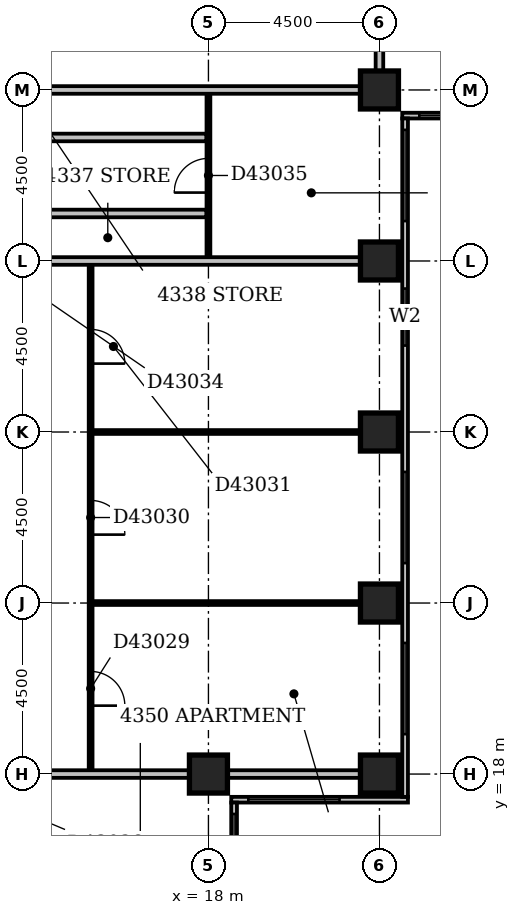
"""IFC4 building model, lengths in metres.
Left out: names, types, materials, properties, quantities, classifications, styles, units other than length and angle.
Written with IfcOpenShell. Run it as: python <this file> out.ifc"""

import sys

from ifc_helpers import new_model, si_unit, direction, frame, frame_2d, origin, origin_2d, place, context, subcontext, project, spatial, rectangle, extrude, element, fill, save


model = new_model("IFC4")
c1 = context("Model", 3, precision=1e-05, world=origin(), true_north=direction((0.0, 1.0)))
c2 = subcontext(c1, "Body", "Model", "MODEL_VIEW")
j1 = project(units=[si_unit("LENGTHUNIT", "METRE"), si_unit("PLANEANGLEUNIT", "RADIAN")], contexts=[c1])
p1 = place(None, origin())
s1 = spatial("IfcSite", under=j1, at=p1, CompositionType="ELEMENT")
p2 = place(p1, origin())
s2 = spatial("IfcBuilding", under=s1, at=p2, CompositionType="ELEMENT")
p3 = place(p2, frame((0.0, 0.0, 170.0)))
s3 = spatial("IfcBuildingStorey", under=s2, at=p3, CompositionType="ELEMENT", Elevation=170.0)
for number, where, z_axis, x_axis in (
    (1, (18.0, 18.0, -0.3), (0.0, 0.0, 1.0), (1.0, 0.0, 0.0)),
    (2, (22.5, 18.0, -0.3), (0.0, 0.0, 1.0), (1.0, 0.0, 0.0)),
    (3, (22.5, 22.5, -0.3), (0.0, 0.0, 1.0), (1.0, 0.0, 0.0)),
    (4, (22.5, 27.0, -0.3), (0.0, 0.0, 1.0), (1.0, 0.0, 0.0)),
    (5, (22.5, 31.5, -0.3), (0.0, 0.0, 1.0), (1.0, 0.0, 0.0)),
    (6, (22.5, 36.0, -0.3), (0.0, 0.0, 1.0), (1.0, 0.0, 0.0)),
):
    element("IfcColumn", number, at=place(p3, frame(where, z_axis=z_axis, x_axis=x_axis)), inside=s3, PredefinedType="COLUMN", context=c2, shape_type="SweptSolid", body=[
        extrude(rectangle(XDim=1.0, YDim=1.0, at=origin_2d()), origin(), (0.0, 0.0, 1.0), 3.45),
    ])
p4 = place(p3, frame((18.675, 8.4, 0.0), z_axis=(0.0, 0.0, 1.0), x_axis=(0.0, 1.0, 0.0)))
e7 = element("IfcWall", 7, at=p4, inside=s3, PredefinedType="STANDARD", context=c2, shape_type="SweptSolid", body=[
    extrude(rectangle(XDim=8.85, YDim=0.15, at=frame_2d((4.425, 0.0))), origin(), (0.0, 0.0, 1.0), 2.5),
])
p5 = place(p4, frame((1.65, 0.0, 0.6)))
e8 = element("IfcOpeningElement", 8, at=p5, cuts=e7, PredefinedType="OPENING", context=c2, shape_type="SweptSolid", body=[
    extrude(rectangle(XDim=2.4, YDim=1.8, at=frame_2d((1.2, 0.9))), frame((0.0, 0.087, 0.0), z_axis=(0.0, -1.0, 0.0), x_axis=(1.0, 0.0, 0.0)), (0.0, 0.0, 1.0), 0.174),
])
p6 = place(p4, frame((6.15, 0.0, 0.6)))
e9 = element("IfcOpeningElement", 9, at=p6, cuts=e7, PredefinedType="OPENING", context=c2, shape_type="SweptSolid", body=[
    extrude(rectangle(XDim=2.4, YDim=1.8, at=frame_2d((1.2, 0.9))), frame((0.0, 0.087, 0.0), z_axis=(0.0, -1.0, 0.0), x_axis=(1.0, 0.0, 0.0)), (0.0, 0.0, 1.0), 0.174),
])
p7 = place(p3, frame((18.6, 17.325, 0.0), z_axis=(0.0, 0.0, 1.0), x_axis=(1.0, 0.0, 0.0)))
e10 = element("IfcWall", 10, at=p7, inside=s3, PredefinedType="STANDARD", context=c2, shape_type="SweptSolid", body=[
    extrude(rectangle(XDim=4.65, YDim=0.15, at=frame_2d((2.325, 0.0))), origin(), (0.0, 0.0, 1.0), 2.5),
])
p8 = place(p7, frame((0.45, 0.0, 0.6)))
e11 = element("IfcOpeningElement", 11, at=p8, cuts=e10, PredefinedType="OPENING", context=c2, shape_type="SweptSolid", body=[
    extrude(rectangle(XDim=2.4, YDim=1.8, at=frame_2d((1.2, 0.9))), frame((0.0, 0.087, 0.0), z_axis=(0.0, -1.0, 0.0), x_axis=(1.0, 0.0, 0.0)), (0.0, 0.0, 1.0), 0.174),
])
p9 = place(p3, frame((23.175, 17.4, 0.0), z_axis=(0.0, 0.0, 1.0), x_axis=(0.0, 1.0, 0.0)))
e12 = element("IfcWall", 12, at=p9, inside=s3, PredefinedType="STANDARD", context=c2, shape_type="SweptSolid", body=[
    extrude(rectangle(XDim=17.85, YDim=0.15, at=frame_2d((8.925, 0.0))), origin(), (0.0, 0.0, 1.0), 2.5),
])
p10 = place(p9, frame((1.65, 0.0, 0.6)))
e13 = element("IfcOpeningElement", 13, at=p10, cuts=e12, PredefinedType="OPENING", context=c2, shape_type="SweptSolid", body=[
    extrude(rectangle(XDim=2.4, YDim=1.8, at=frame_2d((1.2, 0.9))), frame((0.0, 0.087, 0.0), z_axis=(0.0, -1.0, 0.0), x_axis=(1.0, 0.0, 0.0)), (0.0, 0.0, 1.0), 0.174),
])
p11 = place(p9, frame((6.15, 0.0, 0.6)))
e14 = element("IfcOpeningElement", 14, at=p11, cuts=e12, PredefinedType="OPENING", context=c2, shape_type="SweptSolid", body=[
    extrude(rectangle(XDim=2.4, YDim=1.8, at=frame_2d((1.2, 0.9))), frame((0.0, 0.087, 0.0), z_axis=(0.0, -1.0, 0.0), x_axis=(1.0, 0.0, 0.0)), (0.0, 0.0, 1.0), 0.174),
])
p12 = place(p9, frame((11.875, 0.0, 0.6)))
e15 = element("IfcOpeningElement", 15, at=p12, cuts=e12, PredefinedType="OPENING", context=c2, shape_type="SweptSolid", body=[
    extrude(rectangle(XDim=1.5, YDim=1.8, at=frame_2d((0.75, 0.9))), frame((0.0, 0.087, 0.0), z_axis=(0.0, -1.0, 0.0), x_axis=(1.0, 0.0, 0.0)), (0.0, 0.0, 1.0), 0.174),
])
p13 = place(p9, frame((15.15, 0.0, 0.6)))
e16 = element("IfcOpeningElement", 16, at=p13, cuts=e12, PredefinedType="OPENING", context=c2, shape_type="SweptSolid", body=[
    extrude(rectangle(XDim=2.4, YDim=1.8, at=frame_2d((1.2, 0.9))), frame((0.0, 0.087, 0.0), z_axis=(0.0, -1.0, 0.0), x_axis=(1.0, 0.0, 0.0)), (0.0, 0.0, 1.0), 0.174),
])
p14 = place(p3, frame((23.1, 35.325, 0.0), z_axis=(0.0, 0.0, 1.0), x_axis=(1.0, 0.0, 0.0)))
e17 = element("IfcWall", 17, at=p14, inside=s3, PredefinedType="STANDARD", context=c2, shape_type="SweptSolid", body=[
    extrude(rectangle(XDim=45.15, YDim=0.15, at=frame_2d((22.575, 0.0))), origin(), (0.0, 0.0, 1.0), 2.5),
])
p15 = place(p14, frame((0.45, 0.0, 0.6)))
e18 = element("IfcOpeningElement", 18, at=p15, cuts=e17, PredefinedType="OPENING", context=c2, shape_type="SweptSolid", body=[
    extrude(rectangle(XDim=2.4, YDim=1.8, at=frame_2d((1.2, 0.9))), frame((0.0, 0.087, 0.0), z_axis=(0.0, -1.0, 0.0), x_axis=(1.0, 0.0, 0.0)), (0.0, 0.0, 1.0), 0.174),
])
p16 = place(p14, frame((4.684, 0.0, 0.6)))
e19 = element("IfcOpeningElement", 19, at=p16, cuts=e17, PredefinedType="OPENING", context=c2, shape_type="SweptSolid", body=[
    extrude(rectangle(XDim=2.4, YDim=1.8, at=frame_2d((1.2, 0.9))), frame((0.0, 0.087, 0.0), z_axis=(0.0, -1.0, 0.0), x_axis=(1.0, 0.0, 0.0)), (0.0, 0.0, 1.0), 0.174),
])
p17 = place(p14, frame((9.45, 0.0, 0.6)))
e20 = element("IfcOpeningElement", 20, at=p17, cuts=e17, PredefinedType="OPENING", context=c2, shape_type="SweptSolid", body=[
    extrude(rectangle(XDim=2.4, YDim=1.8, at=frame_2d((1.2, 0.9))), frame((0.0, 0.087, 0.0), z_axis=(0.0, -1.0, 0.0), x_axis=(1.0, 0.0, 0.0)), (0.0, 0.0, 1.0), 0.174),
])
p18 = place(p14, frame((13.95, 0.0, 0.6)))
e21 = element("IfcOpeningElement", 21, at=p18, cuts=e17, PredefinedType="OPENING", context=c2, shape_type="SweptSolid", body=[
    extrude(rectangle(XDim=2.4, YDim=1.8, at=frame_2d((1.2, 0.9))), frame((0.0, 0.087, 0.0), z_axis=(0.0, -1.0, 0.0), x_axis=(1.0, 0.0, 0.0)), (0.0, 0.0, 1.0), 0.174),
])
p19 = place(p14, frame((19.076, 0.0, 0.6)))
e22 = element("IfcOpeningElement", 22, at=p19, cuts=e17, PredefinedType="OPENING", context=c2, shape_type="SweptSolid", body=[
    extrude(rectangle(XDim=2.1, YDim=1.8, at=frame_2d((1.05, 0.9))), frame((0.0, 0.087, 0.0), z_axis=(0.0, -1.0, 0.0), x_axis=(1.0, 0.0, 0.0)), (0.0, 0.0, 1.0), 0.174),
])
p20 = place(p14, frame((22.95, 0.0, 0.6)))
e23 = element("IfcOpeningElement", 23, at=p20, cuts=e17, PredefinedType="OPENING", context=c2, shape_type="SweptSolid", body=[
    extrude(rectangle(XDim=2.4, YDim=1.8, at=frame_2d((1.2, 0.9))), frame((0.0, 0.087, 0.0), z_axis=(0.0, -1.0, 0.0), x_axis=(1.0, 0.0, 0.0)), (0.0, 0.0, 1.0), 0.174),
])
p21 = place(p14, frame((27.45, 0.0, 0.6)))
e24 = element("IfcOpeningElement", 24, at=p21, cuts=e17, PredefinedType="OPENING", context=c2, shape_type="SweptSolid", body=[
    extrude(rectangle(XDim=2.4, YDim=1.8, at=frame_2d((1.2, 0.9))), frame((0.0, 0.087, 0.0), z_axis=(0.0, -1.0, 0.0), x_axis=(1.0, 0.0, 0.0)), (0.0, 0.0, 1.0), 0.174),
])
p22 = place(p14, frame((31.95, 0.0, 0.6)))
e25 = element("IfcOpeningElement", 25, at=p22, cuts=e17, PredefinedType="OPENING", context=c2, shape_type="SweptSolid", body=[
    extrude(rectangle(XDim=2.4, YDim=1.8, at=frame_2d((1.2, 0.9))), frame((0.0, 0.087, 0.0), z_axis=(0.0, -1.0, 0.0), x_axis=(1.0, 0.0, 0.0)), (0.0, 0.0, 1.0), 0.174),
])
p23 = place(p14, frame((38.285, 0.0, 0.6)))
e26 = element("IfcOpeningElement", 26, at=p23, cuts=e17, PredefinedType="OPENING", context=c2, shape_type="SweptSolid", body=[
    extrude(rectangle(XDim=0.9, YDim=1.8, at=frame_2d((0.45, 0.9))), frame((0.0, 0.087, 0.0), z_axis=(0.0, -1.0, 0.0), x_axis=(1.0, 0.0, 0.0)), (0.0, 0.0, 1.0), 0.174),
])
p24 = place(p14, frame((40.95, 0.0, 0.6)))
e27 = element("IfcOpeningElement", 27, at=p24, cuts=e17, PredefinedType="OPENING", context=c2, shape_type="SweptSolid", body=[
    extrude(rectangle(XDim=2.4, YDim=1.8, at=frame_2d((1.2, 0.9))), frame((0.0, 0.087, 0.0), z_axis=(0.0, -1.0, 0.0), x_axis=(1.0, 0.0, 0.0)), (0.0, 0.0, 1.0), 0.174),
])
p25 = place(p3, frame((9.1, 18.0, 0.0), z_axis=(0.0, 0.0, 1.0), x_axis=(1.0, 0.0, 0.0)))
e28 = element("IfcWall", 28, at=p25, inside=s3, PredefinedType="PARTITIONING", context=c2, shape_type="SweptSolid", body=[
    extrude(rectangle(XDim=8.4, YDim=0.2, at=frame_2d((4.2, 0.0))), origin(), (0.0, 0.0, 1.0), 2.45),
])
p26 = place(p3, frame((18.5, 18.0, 0.0), z_axis=(0.0, 0.0, 1.0), x_axis=(1.0, 0.0, 0.0)))
e29 = element("IfcWall", 29, at=p26, inside=s3, PredefinedType="PARTITIONING", context=c2, shape_type="SweptSolid", body=[
    extrude(rectangle(XDim=3.5, YDim=0.2, at=frame_2d((1.75, 0.0))), origin(), (0.0, 0.0, 1.0), 2.5),
])
p27 = place(p3, frame((14.9, 18.1, 0.0), z_axis=(0.0, 0.0, 1.0), x_axis=(0.0, 1.0, 0.0)))
e30 = element("IfcWall", 30, at=p27, inside=s3, PredefinedType="PARTITIONING", context=c2, shape_type="SweptSolid", body=[
    extrude(rectangle(XDim=13.3, YDim=0.1, at=frame_2d((6.65, 0.0))), origin(), (0.0, 0.0, 1.0), 3.15),
])
p28 = place(p27, frame((1.7, 0.0, 0.0)))
e31 = element("IfcOpeningElement", 31, at=p28, cuts=e30, PredefinedType="OPENING", context=c2, shape_type="SweptSolid", body=[
    extrude(rectangle(XDim=0.9, YDim=2.1, at=frame_2d((0.45, 1.05))), frame((0.0, 0.062, 0.0), z_axis=(0.0, -1.0, 0.0), x_axis=(1.0, 0.0, 0.0)), (0.0, 0.0, 1.0), 0.124),
])
p29 = place(p27, frame((6.2, 0.0, 0.0)))
e32 = element("IfcOpeningElement", 32, at=p29, cuts=e30, PredefinedType="OPENING", context=c2, shape_type="SweptSolid", body=[
    extrude(rectangle(XDim=0.9, YDim=2.1, at=frame_2d((0.45, 1.05))), frame((0.0, 0.062, 0.0), z_axis=(0.0, -1.0, 0.0), x_axis=(1.0, 0.0, 0.0)), (0.0, 0.0, 1.0), 0.124),
])
p30 = place(p27, frame((10.7, 0.0, 0.0)))
e33 = element("IfcOpeningElement", 33, at=p30, cuts=e30, PredefinedType="OPENING", context=c2, shape_type="SweptSolid", body=[
    extrude(rectangle(XDim=0.9, YDim=2.1, at=frame_2d((0.45, 1.05))), frame((0.0, 0.062, 0.0), z_axis=(0.0, -1.0, 0.0), x_axis=(1.0, 0.0, 0.0)), (0.0, 0.0, 1.0), 0.124),
])
p31 = place(p3, frame((14.95, 22.5, 0.0), z_axis=(0.0, 0.0, 1.0), x_axis=(1.0, 0.0, 0.0)))
e34 = element("IfcWall", 34, at=p31, inside=s3, PredefinedType="PARTITIONING", context=c2, shape_type="SweptSolid", body=[
    extrude(rectangle(XDim=7.05, YDim=0.1, at=frame_2d((3.525, 0.0))), origin(), (0.0, 0.0, 1.0), 3.15),
])
p32 = place(p3, frame((14.95, 27.0, 0.0), z_axis=(0.0, 0.0, 1.0), x_axis=(1.0, 0.0, 0.0)))
e35 = element("IfcWall", 35, at=p32, inside=s3, PredefinedType="PARTITIONING", context=c2, shape_type="SweptSolid", body=[
    extrude(rectangle(XDim=7.05, YDim=0.1, at=frame_2d((3.525, 0.0))), origin(), (0.0, 0.0, 1.0), 2.55),
])
p33 = place(p3, frame((9.1, 31.5, 0.0), z_axis=(0.0, 0.0, 1.0), x_axis=(1.0, 0.0, 0.0)))
e36 = element("IfcWall", 36, at=p33, inside=s3, PredefinedType="PARTITIONING", context=c2, shape_type="SweptSolid", body=[
    extrude(rectangle(XDim=12.9, YDim=0.2, at=frame_2d((6.45, 0.0))), origin(), (0.0, 0.0, 1.0), 3.15),
])
p34 = place(p3, frame((18.0, 31.6, 0.0), z_axis=(0.0, 0.0, 1.0), x_axis=(0.0, 1.0, 0.0)))
e37 = element("IfcWall", 37, at=p34, inside=s3, PredefinedType="PARTITIONING", context=c2, shape_type="SweptSolid", body=[
    extrude(rectangle(XDim=4.3, YDim=0.1, at=frame_2d((2.15, 0.0))), origin(), (0.0, 0.0, 1.0), 3.15),
])
p35 = place(p34, frame((1.7, 0.0, 0.0)))
e38 = element("IfcOpeningElement", 38, at=p35, cuts=e37, PredefinedType="OPENING", context=c2, shape_type="SweptSolid", body=[
    extrude(rectangle(XDim=0.9, YDim=2.1, at=frame_2d((0.45, 1.05))), frame((0.0, 0.062, 0.0), z_axis=(0.0, -1.0, 0.0), x_axis=(1.0, 0.0, 0.0)), (0.0, 0.0, 1.0), 0.124),
])
p36 = place(p3, frame((9.1, 32.75, 0.0), z_axis=(0.0, 0.0, 1.0), x_axis=(1.0, 0.0, 0.0)))
e39 = element("IfcWall", 39, at=p36, inside=s3, PredefinedType="PARTITIONING", context=c2, shape_type="SweptSolid", body=[
    extrude(rectangle(XDim=8.85, YDim=0.2, at=frame_2d((4.425, 0.0))), origin(), (0.0, 0.0, 1.0), 3.15),
])
p37 = place(p36, frame((2.5, 0.0, 0.0)))
e40 = element("IfcOpeningElement", 40, at=p37, cuts=e39, PredefinedType="OPENING", context=c2, shape_type="SweptSolid", body=[
    extrude(rectangle(XDim=0.8, YDim=2.1, at=frame_2d((0.4, 1.05))), frame((0.0, 0.112, 0.0), z_axis=(0.0, -1.0, 0.0), x_axis=(1.0, 0.0, 0.0)), (0.0, 0.0, 1.0), 0.224),
])
p38 = place(p3, frame((9.1, 34.75, 0.0), z_axis=(0.0, 0.0, 1.0), x_axis=(1.0, 0.0, 0.0)))
e41 = element("IfcWall", 41, at=p38, inside=s3, PredefinedType="PARTITIONING", context=c2, shape_type="SweptSolid", body=[
    extrude(rectangle(XDim=8.85, YDim=0.2, at=frame_2d((4.425, 0.0))), origin(), (0.0, 0.0, 1.0), 3.15),
])
p39 = place(p38, frame((2.5, 0.0, 0.0)))
e42 = element("IfcOpeningElement", 42, at=p39, cuts=e41, PredefinedType="OPENING", context=c2, shape_type="SweptSolid", body=[
    extrude(rectangle(XDim=0.8, YDim=2.1, at=frame_2d((0.4, 1.05))), frame((0.0, 0.112, 0.0), z_axis=(0.0, -1.0, 0.0), x_axis=(1.0, 0.0, 0.0)), (0.0, 0.0, 1.0), 0.224),
])
for number, where, z_axis, x_axis in (
    (43, (9.1, 36.0, 0.0), (0.0, 0.0, 1.0), (1.0, 0.0, 0.0)),
    (44, (22.5, 36.5, 0.0), (0.0, 0.0, 1.0), (0.0, 1.0, 0.0)),
):
    element("IfcWall", number, at=place(p3, frame(where, z_axis=z_axis, x_axis=x_axis)), inside=s3, PredefinedType="PARTITIONING", context=c2, shape_type="SweptSolid", body=[
        extrude(rectangle(XDim=12.9, YDim=0.2, at=frame_2d((6.45, 0.0))), origin(), (0.0, 0.0, 1.0), 3.15),
    ])
p40 = place(p6, origin())
e45 = element("IfcWindow", 45, at=p40, inside=s3, PartitioningType="SINGLE_PANEL", PredefinedType="WINDOW", context=c2, shape_type="SweptSolid", body=[
    extrude(rectangle(XDim=2.4, YDim=1.8, at=frame_2d((1.2, 0.9))), frame((0.0, 0.03, 0.0), z_axis=(0.0, -1.0, 0.0), x_axis=(1.0, 0.0, 0.0)), (0.0, 0.0, 1.0), 0.06),
])
fill(e9, e45)
p41 = place(p8, origin())
e46 = element("IfcWindow", 46, at=p41, inside=s3, PartitioningType="SINGLE_PANEL", PredefinedType="WINDOW", context=c2, shape_type="SweptSolid", body=[
    extrude(rectangle(XDim=2.4, YDim=1.8, at=frame_2d((1.2, 0.9))), frame((0.0, 0.03, 0.0), z_axis=(0.0, -1.0, 0.0), x_axis=(1.0, 0.0, 0.0)), (0.0, 0.0, 1.0), 0.06),
])
fill(e11, e46)
p42 = place(p10, origin())
e47 = element("IfcWindow", 47, at=p42, inside=s3, PartitioningType="SINGLE_PANEL", PredefinedType="WINDOW", context=c2, shape_type="SweptSolid", body=[
    extrude(rectangle(XDim=2.4, YDim=1.8, at=frame_2d((1.2, 0.9))), frame((0.0, 0.03, 0.0), z_axis=(0.0, -1.0, 0.0), x_axis=(1.0, 0.0, 0.0)), (0.0, 0.0, 1.0), 0.06),
])
fill(e13, e47)
p43 = place(p11, origin())
e48 = element("IfcWindow", 48, at=p43, inside=s3, PartitioningType="SINGLE_PANEL", PredefinedType="WINDOW", context=c2, shape_type="SweptSolid", body=[
    extrude(rectangle(XDim=2.4, YDim=1.8, at=frame_2d((1.2, 0.9))), frame((0.0, 0.03, 0.0), z_axis=(0.0, -1.0, 0.0), x_axis=(1.0, 0.0, 0.0)), (0.0, 0.0, 1.0), 0.06),
])
fill(e14, e48)
p44 = place(p12, origin())
e49 = element("IfcWindow", 49, at=p44, inside=s3, PartitioningType="SINGLE_PANEL", PredefinedType="WINDOW", context=c2, shape_type="SweptSolid", body=[
    extrude(rectangle(XDim=1.5, YDim=1.8, at=frame_2d((0.75, 0.9))), frame((0.0, 0.03, 0.0), z_axis=(0.0, -1.0, 0.0), x_axis=(1.0, 0.0, 0.0)), (0.0, 0.0, 1.0), 0.06),
])
fill(e15, e49)
p45 = place(p13, origin())
e50 = element("IfcWindow", 50, at=p45, inside=s3, PartitioningType="SINGLE_PANEL", PredefinedType="WINDOW", context=c2, shape_type="SweptSolid", body=[
    extrude(rectangle(XDim=2.4, YDim=1.8, at=frame_2d((1.2, 0.9))), frame((0.0, 0.03, 0.0), z_axis=(0.0, -1.0, 0.0), x_axis=(1.0, 0.0, 0.0)), (0.0, 0.0, 1.0), 0.06),
])
fill(e16, e50)
p46 = place(p15, origin())
e51 = element("IfcWindow", 51, at=p46, inside=s3, PartitioningType="SINGLE_PANEL", PredefinedType="WINDOW", context=c2, shape_type="SweptSolid", body=[
    extrude(rectangle(XDim=2.4, YDim=1.8, at=frame_2d((1.2, 0.9))), frame((0.0, 0.03, 0.0), z_axis=(0.0, -1.0, 0.0), x_axis=(1.0, 0.0, 0.0)), (0.0, 0.0, 1.0), 0.06),
])
fill(e18, e51)
p47 = place(p28, frame((0.9, 0.0, 0.0), z_axis=(0.0, 0.0, 1.0), x_axis=(-1.0, 0.0, 0.0)))
e52 = element("IfcDoor", 52, at=p47, inside=s3, OperationType="SINGLE_SWING_RIGHT", PredefinedType="DOOR", context=c2, shape_type="SweptSolid", body=[
    extrude(rectangle(XDim=0.9, YDim=2.1, at=frame_2d((0.45, 1.05))), frame((0.0, 0.025, 0.0), z_axis=(0.0, -1.0, 0.0), x_axis=(1.0, 0.0, 0.0)), (0.0, 0.0, 1.0), 0.05),
])
fill(e31, e52)
p48 = place(p29, frame((0.9, 0.0, 0.0), z_axis=(0.0, 0.0, 1.0), x_axis=(-1.0, 0.0, 0.0)))
e53 = element("IfcDoor", 53, at=p48, inside=s3, OperationType="SINGLE_SWING_RIGHT", PredefinedType="DOOR", context=c2, shape_type="SweptSolid", body=[
    extrude(rectangle(XDim=0.9, YDim=2.1, at=frame_2d((0.45, 1.05))), frame((0.0, 0.025, 0.0), z_axis=(0.0, -1.0, 0.0), x_axis=(1.0, 0.0, 0.0)), (0.0, 0.0, 1.0), 0.05),
])
fill(e32, e53)
p49 = place(p30, frame((0.9, 0.0, 0.0), z_axis=(0.0, 0.0, 1.0), x_axis=(-1.0, 0.0, 0.0)))
e54 = element("IfcDoor", 54, at=p49, inside=s3, OperationType="SINGLE_SWING_RIGHT", PredefinedType="DOOR", context=c2, shape_type="SweptSolid", body=[
    extrude(rectangle(XDim=0.9, YDim=2.1, at=frame_2d((0.45, 1.05))), frame((0.0, 0.025, 0.0), z_axis=(0.0, -1.0, 0.0), x_axis=(1.0, 0.0, 0.0)), (0.0, 0.0, 1.0), 0.05),
])
fill(e33, e54)
p50 = place(p35, origin())
e55 = element("IfcDoor", 55, at=p50, inside=s3, OperationType="SINGLE_SWING_LEFT", PredefinedType="DOOR", context=c2, shape_type="SweptSolid", body=[
    extrude(rectangle(XDim=0.9, YDim=2.1, at=frame_2d((0.45, 1.05))), frame((0.0, 0.025, 0.0), z_axis=(0.0, -1.0, 0.0), x_axis=(1.0, 0.0, 0.0)), (0.0, 0.0, 1.0), 0.05),
])
fill(e38, e55)
save(model, sys.argv[1])
